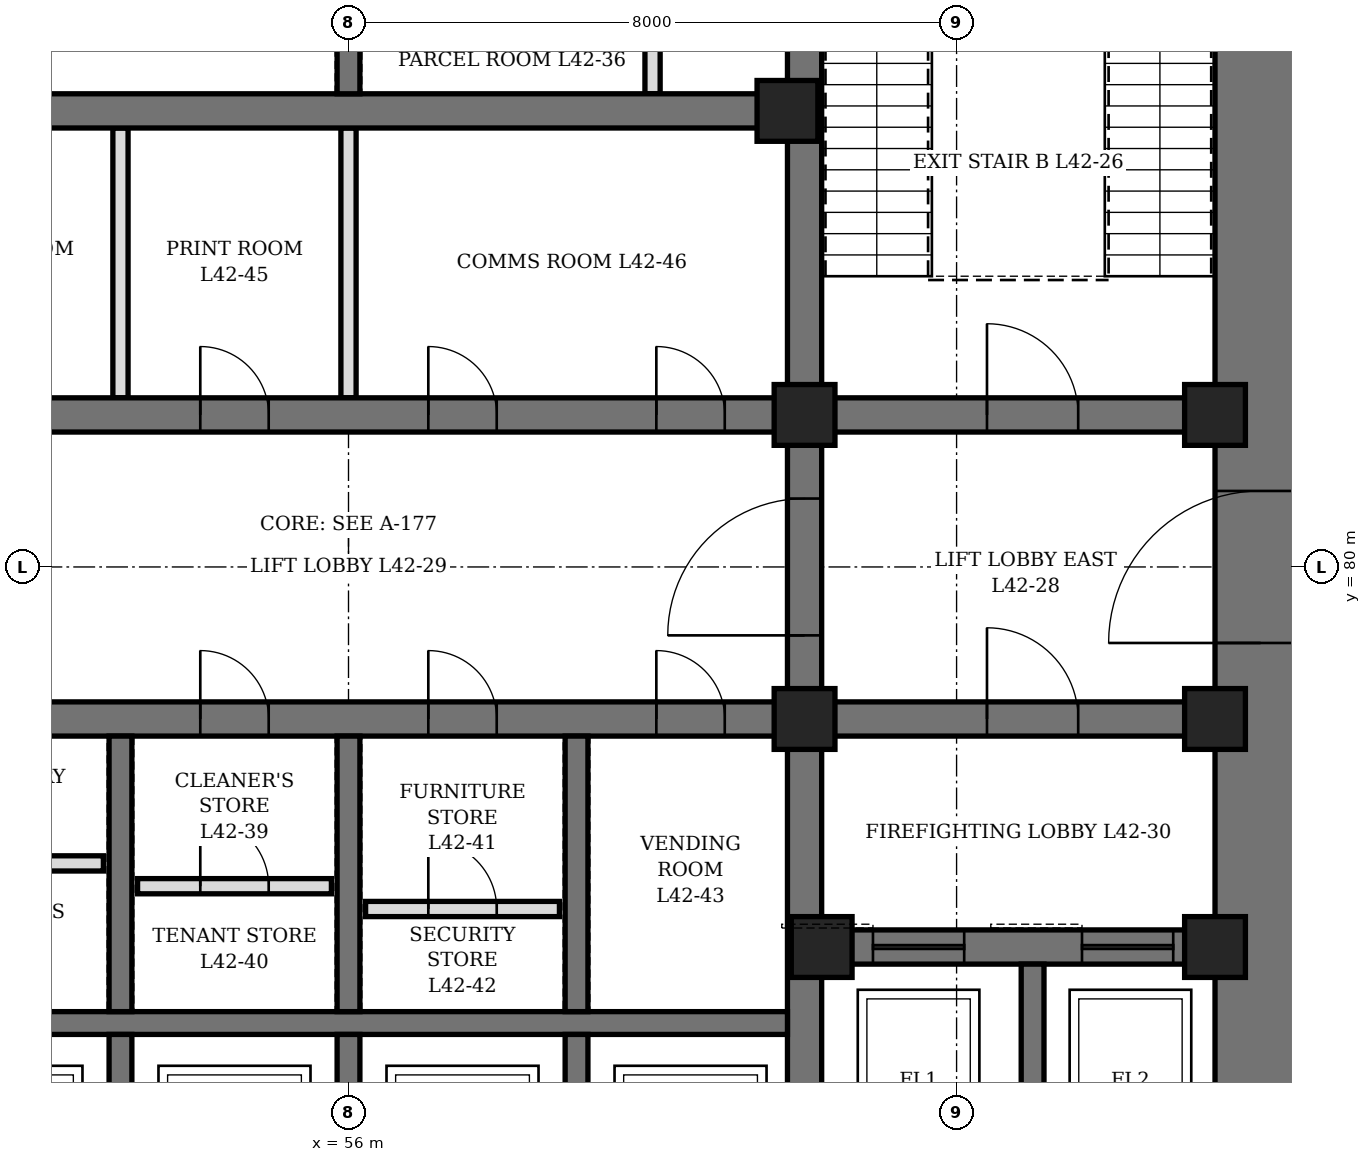
"""IFC4 building model, lengths in metres.
Left out: names, types, materials, properties, quantities, classifications, styles, units other than length and angle.
Written with IfcOpenShell. Run it as: python <this file> out.ifc"""

import sys

from ifc_helpers import new_model, si_unit, direction, frame, frame_2d, origin, origin_2d, place, context, subcontext, project, spatial, rectangle, hollow_rectangle, extrude, element, fill, save


model = new_model("IFC4")
c1 = context("Model", 3, precision=1e-05, world=origin(), true_north=direction((0.0, 1.0)))
c2 = subcontext(c1, "Body", "Model", "MODEL_VIEW")
j1 = project(units=[si_unit("LENGTHUNIT", "METRE"), si_unit("PLANEANGLEUNIT", "RADIAN")], contexts=[c1])
p1 = place(None, origin())
s1 = spatial("IfcSite", under=j1, at=p1, CompositionType="ELEMENT")
p2 = place(p1, origin())
s2 = spatial("IfcBuilding", under=s1, at=p2, CompositionType="ELEMENT")
p3 = place(p2, frame((0.0, 0.0, 189.7)))
s3 = spatial("IfcBuildingStorey", under=s2, at=p3, CompositionType="ELEMENT", Elevation=189.7)
p4 = place(p3, frame((68.0, 70.4, 0.0), z_axis=(0.0, 0.0, 1.0), x_axis=(0.0, 1.0, 0.0)))
e1 = element("IfcWall", 1, at=p4, inside=s3, PredefinedType="SHEAR", context=c2, shape_type="SweptSolid", body=[
    extrude(rectangle(XDim=19.2, YDim=1.2, at=frame_2d((9.6, 0.0))), origin(), (0.0, 0.0, 1.0), 4.2),
])
p5 = place(p4, frame((8.6, 0.0, 0.0)))
e2 = element("IfcOpeningElement", 2, at=p5, cuts=e1, PredefinedType="OPENING", context=c2, shape_type="SweptSolid", body=[
    extrude(rectangle(XDim=2.0, YDim=2.4, at=frame_2d((1.0, 1.2))), frame((0.0, 0.61, 0.0), z_axis=(0.0, -1.0, 0.0), x_axis=(1.0, 0.0, 0.0)), (0.0, 0.0, 1.0), 1.22),
])
p6 = place(p3, frame((62.0, 71.6, 0.0), z_axis=(0.0, 0.0, 1.0), x_axis=(0.0, 1.0, 0.0)))
e3 = element("IfcWall", 3, at=p6, inside=s3, PredefinedType="SHEAR", context=c2, shape_type="SweptSolid", body=[
    extrude(rectangle(XDim=16.8, YDim=0.45, at=frame_2d((8.4, 0.0))), origin(), (0.0, 0.0, 1.0), 4.2),
])
p7 = place(p6, frame((7.5, 0.0, 0.0)))
e4 = element("IfcOpeningElement", 4, at=p7, cuts=e3, PredefinedType="OPENING", context=c2, shape_type="SweptSolid", body=[
    extrude(rectangle(XDim=1.8, YDim=2.4, at=frame_2d((0.9, 1.2))), frame((0.0, 0.235, 0.0), z_axis=(0.0, -1.0, 0.0), x_axis=(1.0, 0.0, 0.0)), (0.0, 0.0, 1.0), 0.47),
])
p8 = place(p3, frame((62.225, 75.0, 0.0), z_axis=(0.0, 0.0, 1.0), x_axis=(1.0, 0.0, 0.0)))
e5 = element("IfcWall", 5, at=p8, inside=s3, PredefinedType="SHEAR", context=c2, shape_type="SweptSolid", body=[
    extrude(rectangle(XDim=5.175, YDim=0.45, at=frame_2d((2.587, 0.0))), origin(), (0.0, 0.0, 1.0), 4.2),
])
p9 = place(p8, frame((0.675, 0.0, 0.0)))
e6 = element("IfcOpeningElement", 6, at=p9, cuts=e5, PredefinedType="OPENING", context=c2, shape_type="SweptSolid", body=[
    extrude(rectangle(XDim=1.2, YDim=2.2, at=frame_2d((0.6, 1.1))), frame((0.0, 0.235, 0.0), z_axis=(0.0, -1.0, 0.0), x_axis=(1.0, 0.0, 0.0)), (0.0, 0.0, 1.0), 0.47),
])
p10 = place(p8, frame((3.425, 0.0, 0.0)))
e7 = element("IfcOpeningElement", 7, at=p10, cuts=e5, PredefinedType="OPENING", context=c2, shape_type="SweptSolid", body=[
    extrude(rectangle(XDim=1.2, YDim=2.2, at=frame_2d((0.6, 1.1))), frame((0.0, 0.235, 0.0), z_axis=(0.0, -1.0, 0.0), x_axis=(1.0, 0.0, 0.0)), (0.0, 0.0, 1.0), 0.47),
])
p11 = place(p3, frame((62.225, 78.0, 0.0), z_axis=(0.0, 0.0, 1.0), x_axis=(1.0, 0.0, 0.0)))
e8 = element("IfcWall", 8, at=p11, inside=s3, PredefinedType="SHEAR", context=c2, shape_type="SweptSolid", body=[
    extrude(rectangle(XDim=5.175, YDim=0.45, at=frame_2d((2.587, 0.0))), origin(), (0.0, 0.0, 1.0), 4.2),
])
p12 = place(p11, frame((2.175, 0.0, 0.0)))
e9 = element("IfcOpeningElement", 9, at=p12, cuts=e8, PredefinedType="OPENING", context=c2, shape_type="SweptSolid", body=[
    extrude(rectangle(XDim=1.2, YDim=2.1, at=frame_2d((0.6, 1.05))), frame((0.0, 0.235, 0.0), z_axis=(0.0, -1.0, 0.0), x_axis=(1.0, 0.0, 0.0)), (0.0, 0.0, 1.0), 0.47),
])
p13 = place(p3, frame((62.225, 82.0, 0.0), z_axis=(0.0, 0.0, 1.0), x_axis=(1.0, 0.0, 0.0)))
e10 = element("IfcWall", 10, at=p13, inside=s3, PredefinedType="SHEAR", context=c2, shape_type="SweptSolid", body=[
    extrude(rectangle(XDim=5.175, YDim=0.45, at=frame_2d((2.587, 0.0))), origin(), (0.0, 0.0, 1.0), 4.2),
])
p14 = place(p13, frame((2.175, 0.0, 0.0)))
e11 = element("IfcOpeningElement", 11, at=p14, cuts=e10, PredefinedType="OPENING", context=c2, shape_type="SweptSolid", body=[
    extrude(rectangle(XDim=1.2, YDim=2.1, at=frame_2d((0.6, 1.05))), frame((0.0, 0.235, 0.0), z_axis=(0.0, -1.0, 0.0), x_axis=(1.0, 0.0, 0.0)), (0.0, 0.0, 1.0), 0.47),
])
p15 = place(p3, frame((50.225, 78.0, 0.0), z_axis=(0.0, 0.0, 1.0), x_axis=(1.0, 0.0, 0.0)))
e12 = element("IfcWall", 12, at=p15, inside=s3, PredefinedType="SHEAR", context=c2, shape_type="SweptSolid", body=[
    extrude(rectangle(XDim=11.55, YDim=0.45, at=frame_2d((5.775, 0.0))), origin(), (0.0, 0.0, 1.0), 4.2),
])
p16 = place(p15, frame((0.825, 0.0, 0.0)))
e13 = element("IfcOpeningElement", 13, at=p16, cuts=e12, PredefinedType="OPENING", context=c2, shape_type="SweptSolid", body=[
    extrude(rectangle(XDim=0.9, YDim=2.1, at=frame_2d((0.45, 1.05))), frame((0.0, 0.235, 0.0), z_axis=(0.0, -1.0, 0.0), x_axis=(1.0, 0.0, 0.0)), (0.0, 0.0, 1.0), 0.47),
])
p17 = place(p15, frame((3.825, 0.0, 0.0)))
e14 = element("IfcOpeningElement", 14, at=p17, cuts=e12, PredefinedType="OPENING", context=c2, shape_type="SweptSolid", body=[
    extrude(rectangle(XDim=0.9, YDim=2.1, at=frame_2d((0.45, 1.05))), frame((0.0, 0.235, 0.0), z_axis=(0.0, -1.0, 0.0), x_axis=(1.0, 0.0, 0.0)), (0.0, 0.0, 1.0), 0.47),
])
p18 = place(p15, frame((6.825, 0.0, 0.0)))
e15 = element("IfcOpeningElement", 15, at=p18, cuts=e12, PredefinedType="OPENING", context=c2, shape_type="SweptSolid", body=[
    extrude(rectangle(XDim=0.9, YDim=2.1, at=frame_2d((0.45, 1.05))), frame((0.0, 0.235, 0.0), z_axis=(0.0, -1.0, 0.0), x_axis=(1.0, 0.0, 0.0)), (0.0, 0.0, 1.0), 0.47),
])
p19 = place(p15, frame((9.825, 0.0, 0.0)))
e16 = element("IfcOpeningElement", 16, at=p19, cuts=e12, PredefinedType="OPENING", context=c2, shape_type="SweptSolid", body=[
    extrude(rectangle(XDim=0.9, YDim=2.1, at=frame_2d((0.45, 1.05))), frame((0.0, 0.235, 0.0), z_axis=(0.0, -1.0, 0.0), x_axis=(1.0, 0.0, 0.0)), (0.0, 0.0, 1.0), 0.47),
])
p20 = place(p3, frame((50.225, 82.0, 0.0), z_axis=(0.0, 0.0, 1.0), x_axis=(1.0, 0.0, 0.0)))
e17 = element("IfcWall", 17, at=p20, inside=s3, PredefinedType="SHEAR", context=c2, shape_type="SweptSolid", body=[
    extrude(rectangle(XDim=11.55, YDim=0.45, at=frame_2d((5.775, 0.0))), origin(), (0.0, 0.0, 1.0), 4.2),
])
p21 = place(p20, frame((0.825, 0.0, 0.0)))
e18 = element("IfcOpeningElement", 18, at=p21, cuts=e17, PredefinedType="OPENING", context=c2, shape_type="SweptSolid", body=[
    extrude(rectangle(XDim=0.9, YDim=2.1, at=frame_2d((0.45, 1.05))), frame((0.0, 0.235, 0.0), z_axis=(0.0, -1.0, 0.0), x_axis=(1.0, 0.0, 0.0)), (0.0, 0.0, 1.0), 0.47),
])
p22 = place(p20, frame((3.825, 0.0, 0.0)))
e19 = element("IfcOpeningElement", 19, at=p22, cuts=e17, PredefinedType="OPENING", context=c2, shape_type="SweptSolid", body=[
    extrude(rectangle(XDim=0.9, YDim=2.1, at=frame_2d((0.45, 1.05))), frame((0.0, 0.235, 0.0), z_axis=(0.0, -1.0, 0.0), x_axis=(1.0, 0.0, 0.0)), (0.0, 0.0, 1.0), 0.47),
])
p23 = place(p20, frame((6.825, 0.0, 0.0)))
e20 = element("IfcOpeningElement", 20, at=p23, cuts=e17, PredefinedType="OPENING", context=c2, shape_type="SweptSolid", body=[
    extrude(rectangle(XDim=0.9, YDim=2.1, at=frame_2d((0.45, 1.05))), frame((0.0, 0.235, 0.0), z_axis=(0.0, -1.0, 0.0), x_axis=(1.0, 0.0, 0.0)), (0.0, 0.0, 1.0), 0.47),
])
p24 = place(p20, frame((9.825, 0.0, 0.0)))
e21 = element("IfcOpeningElement", 21, at=p24, cuts=e17, PredefinedType="OPENING", context=c2, shape_type="SweptSolid", body=[
    extrude(rectangle(XDim=0.9, YDim=2.1, at=frame_2d((0.45, 1.05))), frame((0.0, 0.235, 0.0), z_axis=(0.0, -1.0, 0.0), x_axis=(1.0, 0.0, 0.0)), (0.0, 0.0, 1.0), 0.47),
])
p25 = place(p3, frame((50.225, 86.0, 0.0), z_axis=(0.0, 0.0, 1.0), x_axis=(1.0, 0.0, 0.0)))
e22 = element("IfcWall", 22, at=p25, inside=s3, PredefinedType="SHEAR", context=c2, shape_type="SweptSolid", body=[
    extrude(rectangle(XDim=11.55, YDim=0.45, at=frame_2d((5.775, 0.0))), origin(), (0.0, 0.0, 1.0), 4.2),
])
p26 = place(p3, frame((50.225, 74.0, 0.0), z_axis=(0.0, 0.0, 1.0), x_axis=(1.0, 0.0, 0.0)))
e23 = element("IfcWall", 23, at=p26, inside=s3, PredefinedType="SHEAR", context=c2, shape_type="SweptSolid", body=[
    extrude(rectangle(XDim=11.55, YDim=0.3, at=frame_2d((5.775, 0.0))), origin(), (0.0, 0.0, 1.0), 4.2),
])
p27 = place(p3, frame((53.0, 71.6, 0.0), z_axis=(0.0, 0.0, 1.0), x_axis=(0.0, 1.0, 0.0)))
e24 = element("IfcWall", 24, at=p27, inside=s3, PredefinedType="SHEAR", context=c2, shape_type="SweptSolid", body=[
    extrude(rectangle(XDim=2.25, YDim=0.3, at=frame_2d((1.125, 0.0))), origin(), (0.0, 0.0, 1.0), 4.2),
])
p28 = place(p3, frame((53.0, 74.15, 0.0), z_axis=(0.0, 0.0, 1.0), x_axis=(0.0, 1.0, 0.0)))
e25 = element("IfcWall", 25, at=p28, inside=s3, PredefinedType="SHEAR", context=c2, shape_type="SweptSolid", body=[
    extrude(rectangle(XDim=3.625, YDim=0.3, at=frame_2d((1.812, 0.0))), origin(), (0.0, 0.0, 1.0), 4.2),
])
p29 = place(p3, frame((56.0, 71.6, 0.0), z_axis=(0.0, 0.0, 1.0), x_axis=(0.0, 1.0, 0.0)))
e26 = element("IfcWall", 26, at=p29, inside=s3, PredefinedType="SHEAR", context=c2, shape_type="SweptSolid", body=[
    extrude(rectangle(XDim=2.25, YDim=0.3, at=frame_2d((1.125, 0.0))), origin(), (0.0, 0.0, 1.0), 4.2),
])
p30 = place(p3, frame((56.0, 74.15, 0.0), z_axis=(0.0, 0.0, 1.0), x_axis=(0.0, 1.0, 0.0)))
e27 = element("IfcWall", 27, at=p30, inside=s3, PredefinedType="SHEAR", context=c2, shape_type="SweptSolid", body=[
    extrude(rectangle(XDim=3.625, YDim=0.3, at=frame_2d((1.812, 0.0))), origin(), (0.0, 0.0, 1.0), 4.2),
])
p31 = place(p3, frame((59.0, 71.6, 0.0), z_axis=(0.0, 0.0, 1.0), x_axis=(0.0, 1.0, 0.0)))
e28 = element("IfcWall", 28, at=p31, inside=s3, PredefinedType="SHEAR", context=c2, shape_type="SweptSolid", body=[
    extrude(rectangle(XDim=2.25, YDim=0.3, at=frame_2d((1.125, 0.0))), origin(), (0.0, 0.0, 1.0), 4.2),
])
p32 = place(p3, frame((59.0, 74.15, 0.0), z_axis=(0.0, 0.0, 1.0), x_axis=(0.0, 1.0, 0.0)))
e29 = element("IfcWall", 29, at=p32, inside=s3, PredefinedType="SHEAR", context=c2, shape_type="SweptSolid", body=[
    extrude(rectangle(XDim=3.625, YDim=0.3, at=frame_2d((1.812, 0.0))), origin(), (0.0, 0.0, 1.0), 4.2),
])
p33 = place(p3, frame((65.0, 71.6, 0.0), z_axis=(0.0, 0.0, 1.0), x_axis=(0.0, 1.0, 0.0)))
e30 = element("IfcWall", 30, at=p33, inside=s3, PredefinedType="SHEAR", context=c2, shape_type="SweptSolid", body=[
    extrude(rectangle(XDim=3.175, YDim=0.3, at=frame_2d((1.587, 0.0))), origin(), (0.0, 0.0, 1.0), 4.2),
])
p34 = place(p3, frame((56.0, 86.225, 0.0), z_axis=(0.0, 0.0, 1.0), x_axis=(0.0, 1.0, 0.0)))
e31 = element("IfcWall", 31, at=p34, inside=s3, PredefinedType="SHEAR", context=c2, shape_type="SweptSolid", body=[
    extrude(rectangle(XDim=2.175, YDim=0.3, at=frame_2d((1.087, 0.0))), origin(), (0.0, 0.0, 1.0), 4.2),
])
for number, where, z_axis, x_axis in (
    (32, (61.775, 86.0, 0.0), (0.0, 0.0, 1.0), (1.0, 0.0, 0.0)),
    (33, (62.0, 78.0, 0.0), (0.0, 0.0, 1.0), (1.0, 0.0, 0.0)),
    (34, (62.0, 82.0, 0.0), (0.0, 0.0, 1.0), (1.0, 0.0, 0.0)),
    (35, (62.225, 75.0, 0.0), (0.0, 0.0, 1.0), (1.0, 0.0, 0.0)),
    (36, (67.4, 75.0, 0.0), (0.0, 0.0, 1.0), (1.0, 0.0, 0.0)),
    (37, (67.4, 78.0, 0.0), (0.0, 0.0, 1.0), (1.0, 0.0, 0.0)),
    (38, (67.4, 82.0, 0.0), (0.0, 0.0, 1.0), (1.0, 0.0, 0.0)),
):
    element("IfcColumn", number, at=place(p3, frame(where, z_axis=z_axis, x_axis=x_axis)), inside=s3, PredefinedType="COLUMN", context=c2, shape_type="SweptSolid", body=[
        extrude(hollow_rectangle(XDim=0.8, YDim=0.8, WallThickness=0.1, at=origin_2d()), origin(), (0.0, 0.0, 1.0), 4.2),
    ])
p35 = place(p3, frame((60.0, 86.225, 0.0), z_axis=(0.0, 0.0, 1.0), x_axis=(0.0, 1.0, 0.0)))
e39 = element("IfcWall", 39, at=p35, inside=s3, PredefinedType="PARTITIONING", context=c2, shape_type="SweptSolid", body=[
    extrude(rectangle(XDim=2.175, YDim=0.2, at=frame_2d((1.087, 0.0))), origin(), (0.0, 0.0, 1.0), 4.04),
])
p36 = place(p35, frame((0.637, 0.0, 0.0)))
e40 = element("IfcOpeningElement", 40, at=p36, cuts=e39, PredefinedType="OPENING", context=c2, shape_type="SweptSolid", body=[
    extrude(rectangle(XDim=0.9, YDim=2.1, at=frame_2d((0.45, 1.05))), frame((0.0, 0.11, 0.0), z_axis=(0.0, -1.0, 0.0), x_axis=(1.0, 0.0, 0.0)), (0.0, 0.0, 1.0), 0.22),
])
p37 = place(p3, frame((50.225, 76.1, 0.0), z_axis=(0.0, 0.0, 1.0), x_axis=(1.0, 0.0, 0.0)))
e41 = element("IfcWall", 41, at=p37, inside=s3, PredefinedType="PARTITIONING", context=c2, shape_type="SweptSolid", body=[
    extrude(rectangle(XDim=2.55, YDim=0.2, at=frame_2d((1.275, 0.0))), origin(), (0.0, 0.0, 1.0), 4.04),
])
p38 = place(p37, frame((0.825, 0.0, 0.0)))
e42 = element("IfcOpeningElement", 42, at=p38, cuts=e41, PredefinedType="OPENING", context=c2, shape_type="SweptSolid", body=[
    extrude(rectangle(XDim=0.9, YDim=2.1, at=frame_2d((0.45, 1.05))), frame((0.0, 0.11, 0.0), z_axis=(0.0, -1.0, 0.0), x_axis=(1.0, 0.0, 0.0)), (0.0, 0.0, 1.0), 0.22),
])
p39 = place(p3, frame((53.225, 75.8, 0.0), z_axis=(0.0, 0.0, 1.0), x_axis=(1.0, 0.0, 0.0)))
e43 = element("IfcWall", 43, at=p39, inside=s3, PredefinedType="PARTITIONING", context=c2, shape_type="SweptSolid", body=[
    extrude(rectangle(XDim=2.55, YDim=0.2, at=frame_2d((1.275, 0.0))), origin(), (0.0, 0.0, 1.0), 4.04),
])
p40 = place(p39, frame((0.825, 0.0, 0.0)))
e44 = element("IfcOpeningElement", 44, at=p40, cuts=e43, PredefinedType="OPENING", context=c2, shape_type="SweptSolid", body=[
    extrude(rectangle(XDim=0.9, YDim=2.1, at=frame_2d((0.45, 1.05))), frame((0.0, 0.11, 0.0), z_axis=(0.0, -1.0, 0.0), x_axis=(1.0, 0.0, 0.0)), (0.0, 0.0, 1.0), 0.22),
])
p41 = place(p3, frame((56.225, 75.5, 0.0), z_axis=(0.0, 0.0, 1.0), x_axis=(1.0, 0.0, 0.0)))
e45 = element("IfcWall", 45, at=p41, inside=s3, PredefinedType="PARTITIONING", context=c2, shape_type="SweptSolid", body=[
    extrude(rectangle(XDim=2.55, YDim=0.2, at=frame_2d((1.275, 0.0))), origin(), (0.0, 0.0, 1.0), 4.04),
])
p42 = place(p41, frame((0.825, 0.0, 0.0)))
e46 = element("IfcOpeningElement", 46, at=p42, cuts=e45, PredefinedType="OPENING", context=c2, shape_type="SweptSolid", body=[
    extrude(rectangle(XDim=0.9, YDim=2.1, at=frame_2d((0.45, 1.05))), frame((0.0, 0.11, 0.0), z_axis=(0.0, -1.0, 0.0), x_axis=(1.0, 0.0, 0.0)), (0.0, 0.0, 1.0), 0.22),
])
p43 = place(p3, frame((53.0, 82.225, 0.0), z_axis=(0.0, 0.0, 1.0), x_axis=(0.0, 1.0, 0.0)))
e47 = element("IfcWall", 47, at=p43, inside=s3, PredefinedType="PARTITIONING", context=c2, shape_type="SweptSolid", body=[
    extrude(rectangle(XDim=3.55, YDim=0.2, at=frame_2d((1.775, 0.0))), origin(), (0.0, 0.0, 1.0), 4.04),
])
p44 = place(p3, frame((56.0, 82.225, 0.0), z_axis=(0.0, 0.0, 1.0), x_axis=(0.0, 1.0, 0.0)))
e48 = element("IfcWall", 48, at=p44, inside=s3, PredefinedType="PARTITIONING", context=c2, shape_type="SweptSolid", body=[
    extrude(rectangle(XDim=3.55, YDim=0.2, at=frame_2d((1.775, 0.0))), origin(), (0.0, 0.0, 1.0), 2.54),
])
p45 = place(p17, origin())
e49 = element("IfcDoor", 49, at=p45, inside=s3, OperationType="SINGLE_SWING_LEFT", PredefinedType="DOOR", context=c2, shape_type="SweptSolid", body=[
    extrude(rectangle(XDim=0.9, YDim=2.1, at=frame_2d((0.45, 1.05))), frame((0.0, 0.225, 0.0), z_axis=(0.0, -1.0, 0.0), x_axis=(1.0, 0.0, 0.0)), (0.0, 0.0, 1.0), 0.449),
])
fill(e14, e49)
p46 = place(p40, origin())
e50 = element("IfcDoor", 50, at=p46, inside=s3, OperationType="SINGLE_SWING_LEFT", PredefinedType="DOOR", context=c2, shape_type="SweptSolid", body=[
    extrude(rectangle(XDim=0.9, YDim=2.1, at=frame_2d((0.45, 1.05))), frame((0.0, 0.1, 0.0), z_axis=(0.0, -1.0, 0.0), x_axis=(1.0, 0.0, 0.0)), (0.0, 0.0, 1.0), 0.199),
])
fill(e44, e50)
p47 = place(p18, origin())
e51 = element("IfcDoor", 51, at=p47, inside=s3, OperationType="SINGLE_SWING_LEFT", PredefinedType="DOOR", context=c2, shape_type="SweptSolid", body=[
    extrude(rectangle(XDim=0.9, YDim=2.1, at=frame_2d((0.45, 1.05))), frame((0.0, 0.225, 0.0), z_axis=(0.0, -1.0, 0.0), x_axis=(1.0, 0.0, 0.0)), (0.0, 0.0, 1.0), 0.449),
])
fill(e15, e51)
p48 = place(p42, origin())
e52 = element("IfcDoor", 52, at=p48, inside=s3, OperationType="SINGLE_SWING_LEFT", PredefinedType="DOOR", context=c2, shape_type="SweptSolid", body=[
    extrude(rectangle(XDim=0.9, YDim=2.1, at=frame_2d((0.45, 1.05))), frame((0.0, 0.1, 0.0), z_axis=(0.0, -1.0, 0.0), x_axis=(1.0, 0.0, 0.0)), (0.0, 0.0, 1.0), 0.199),
])
fill(e46, e52)
p49 = place(p19, origin())
e53 = element("IfcDoor", 53, at=p49, inside=s3, OperationType="SINGLE_SWING_LEFT", PredefinedType="DOOR", context=c2, shape_type="SweptSolid", body=[
    extrude(rectangle(XDim=0.9, YDim=2.1, at=frame_2d((0.45, 1.05))), frame((0.0, 0.225, 0.0), z_axis=(0.0, -1.0, 0.0), x_axis=(1.0, 0.0, 0.0)), (0.0, 0.0, 1.0), 0.449),
])
fill(e16, e53)
p50 = place(p22, origin())
e54 = element("IfcDoor", 54, at=p50, inside=s3, OperationType="SINGLE_SWING_LEFT", PredefinedType="DOOR", context=c2, shape_type="SweptSolid", body=[
    extrude(rectangle(XDim=0.9, YDim=2.1, at=frame_2d((0.45, 1.05))), frame((0.0, 0.225, 0.0), z_axis=(0.0, -1.0, 0.0), x_axis=(1.0, 0.0, 0.0)), (0.0, 0.0, 1.0), 0.449),
])
fill(e19, e54)
p51 = place(p23, origin())
e55 = element("IfcDoor", 55, at=p51, inside=s3, OperationType="SINGLE_SWING_LEFT", PredefinedType="DOOR", context=c2, shape_type="SweptSolid", body=[
    extrude(rectangle(XDim=0.9, YDim=2.1, at=frame_2d((0.45, 1.05))), frame((0.0, 0.225, 0.0), z_axis=(0.0, -1.0, 0.0), x_axis=(1.0, 0.0, 0.0)), (0.0, 0.0, 1.0), 0.449),
])
fill(e20, e55)
p52 = place(p24, origin())
e56 = element("IfcDoor", 56, at=p52, inside=s3, OperationType="SINGLE_SWING_LEFT", PredefinedType="DOOR", context=c2, shape_type="SweptSolid", body=[
    extrude(rectangle(XDim=0.9, YDim=2.1, at=frame_2d((0.45, 1.05))), frame((0.0, 0.225, 0.0), z_axis=(0.0, -1.0, 0.0), x_axis=(1.0, 0.0, 0.0)), (0.0, 0.0, 1.0), 0.449),
])
fill(e21, e56)
p53 = place(p14, origin())
e57 = element("IfcDoor", 57, at=p53, inside=s3, OperationType="SINGLE_SWING_LEFT", PredefinedType="DOOR", context=c2, shape_type="SweptSolid", body=[
    extrude(rectangle(XDim=1.2, YDim=2.1, at=frame_2d((0.6, 1.05))), frame((0.0, 0.225, 0.0), z_axis=(0.0, -1.0, 0.0), x_axis=(1.0, 0.0, 0.0)), (0.0, 0.0, 1.0), 0.449),
])
fill(e11, e57)
p54 = place(p5, origin())
e58 = element("IfcDoor", 58, at=p54, inside=s3, OperationType="DOUBLE_DOOR_SINGLE_SWING", PredefinedType="DOOR", context=c2, shape_type="SweptSolid", body=[
    extrude(rectangle(XDim=2.0, YDim=2.4, at=frame_2d((1.0, 1.2))), frame((0.0, 0.35, 0.0), z_axis=(0.0, -1.0, 0.0), x_axis=(1.0, 0.0, 0.0)), (0.0, 0.0, 1.0), 0.7),
])
fill(e2, e58)
p55 = place(p7, origin())
e59 = element("IfcDoor", 59, at=p55, inside=s3, OperationType="DOUBLE_DOOR_SINGLE_SWING", PredefinedType="DOOR", context=c2, shape_type="SweptSolid", body=[
    extrude(rectangle(XDim=1.8, YDim=2.4, at=frame_2d((0.9, 1.2))), frame((0.0, 0.225, 0.0), z_axis=(0.0, -1.0, 0.0), x_axis=(1.0, 0.0, 0.0)), (0.0, 0.0, 1.0), 0.449),
])
fill(e4, e59)
p56 = place(p12, origin())
e60 = element("IfcDoor", 60, at=p56, inside=s3, OperationType="SINGLE_SWING_RIGHT", PredefinedType="DOOR", context=c2, shape_type="SweptSolid", body=[
    extrude(rectangle(XDim=1.2, YDim=2.1, at=frame_2d((0.6, 1.05))), frame((0.0, 0.225, 0.0), z_axis=(0.0, -1.0, 0.0), x_axis=(1.0, 0.0, 0.0)), (0.0, 0.0, 1.0), 0.449),
])
fill(e9, e60)
p57 = place(p9, origin())
e61 = element("IfcDoor", 61, at=p57, inside=s3, OperationType="SLIDING_TO_LEFT", PredefinedType="DOOR", context=c2, shape_type="SweptSolid", body=[
    extrude(rectangle(XDim=1.2, YDim=2.2, at=frame_2d((0.6, 1.1))), frame((0.0, 0.225, 0.0), z_axis=(0.0, -1.0, 0.0), x_axis=(1.0, 0.0, 0.0)), (0.0, 0.0, 1.0), 0.449),
])
fill(e6, e61)
p58 = place(p10, origin())
e62 = element("IfcDoor", 62, at=p58, inside=s3, OperationType="SLIDING_TO_LEFT", PredefinedType="DOOR", context=c2, shape_type="SweptSolid", body=[
    extrude(rectangle(XDim=1.2, YDim=2.2, at=frame_2d((0.6, 1.1))), frame((0.0, 0.225, 0.0), z_axis=(0.0, -1.0, 0.0), x_axis=(1.0, 0.0, 0.0)), (0.0, 0.0, 1.0), 0.449),
])
fill(e7, e62)
save(model, sys.argv[1])
